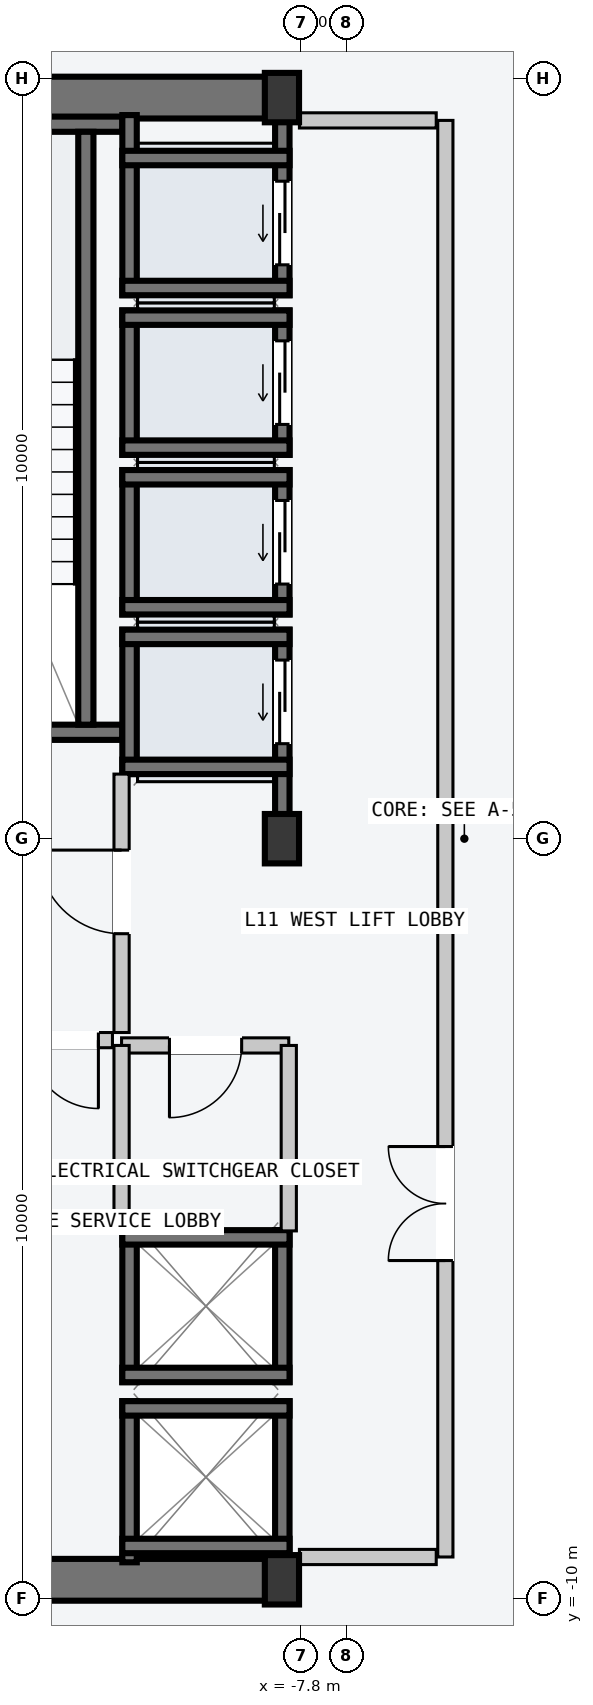
"""IFC4 building model, lengths in metres.
Left out: names, types, materials, properties, quantities, classifications, styles, units other than length and angle.
Written with IfcOpenShell. Run it as: python <this file> out.ifc"""

import sys

from ifc_helpers import new_model, si_unit, direction, frame, frame_2d, origin, origin_2d, place, context, subcontext, project, spatial, rectangle, i_section, extrude, element, fill, save


model = new_model("IFC4")
c1 = context("Model", 3, precision=1e-05, world=origin(), true_north=direction((0.0, 1.0)))
c2 = subcontext(c1, "Body", "Model", "MODEL_VIEW")
j1 = project(units=[si_unit("LENGTHUNIT", "METRE"), si_unit("PLANEANGLEUNIT", "RADIAN")], contexts=[c1])
p1 = place(None, origin())
s1 = spatial("IfcSite", under=j1, at=p1, CompositionType="ELEMENT")
p2 = place(p1, origin())
s2 = spatial("IfcBuilding", under=s1, at=p2, CompositionType="ELEMENT")
p3 = place(p2, frame((0.0, 0.0, 45.6)))
s3 = spatial("IfcBuildingStorey", under=s2, at=p3, CompositionType="ELEMENT", Elevation=45.6)
for number, where, z_axis, x_axis in (
    (1, (-14.53, -9.75, -0.2), (0.0, 0.0, 1.0), (1.0, 0.0, 0.0)),
    (2, (-14.53, 9.75, -0.2), (0.0, 0.0, 1.0), (1.0, 0.0, 0.0)),
):
    element("IfcWall", number, at=place(p3, frame(where, z_axis=z_axis, x_axis=x_axis)), inside=s3, PredefinedType="SHEAR", context=c2, shape_type="SweptSolid", body=[
        extrude(rectangle(XDim=6.46, YDim=0.55, at=frame_2d((3.23, 0.0))), origin(), (0.0, 0.0, 1.0), 3.6),
    ])
p4 = place(p3, frame((-14.25, 1.4, -0.2), z_axis=(0.0, 0.0, 1.0), x_axis=(1.0, 0.0, 0.0)))
e3 = element("IfcWall", 3, at=p4, inside=s3, PredefinedType="SOLIDWALL", context=c2, shape_type="SweptSolid", body=[
    extrude(rectangle(XDim=4.1, YDim=0.2, at=frame_2d((2.05, 0.0))), origin(), (0.0, 0.0, 1.0), 3.6),
])
p5 = place(p4, frame((1.5, 0.0, 0.2)))
e4 = element("IfcOpeningElement", 4, at=p5, cuts=e3, PredefinedType="OPENING", context=c2, shape_type="SweptSolid", body=[
    extrude(rectangle(XDim=1.12, YDim=2.18, at=frame_2d((0.56, 1.09))), frame((0.0, 0.11, 0.0), z_axis=(0.0, -1.0, 0.0), x_axis=(1.0, 0.0, 0.0)), (0.0, 0.0, 1.0), 0.22),
])
p6 = place(p3, frame((-14.25, 9.4, -0.2), z_axis=(0.0, 0.0, 1.0), x_axis=(1.0, 0.0, 0.0)))
e5 = element("IfcWall", 5, at=p6, inside=s3, PredefinedType="SOLIDWALL", context=c2, shape_type="SweptSolid", body=[
    extrude(rectangle(XDim=4.1, YDim=0.2, at=frame_2d((2.05, 0.0))), origin(), (0.0, 0.0, 1.0), 3.6),
])
p7 = place(p3, frame((-10.63, 1.5, -0.2), z_axis=(0.0, 0.0, 1.0), x_axis=(0.0, 1.0, 0.0)))
e6 = element("IfcWall", 6, at=p7, inside=s3, PredefinedType="SOLIDWALL", context=c2, shape_type="SweptSolid", body=[
    extrude(rectangle(XDim=7.8, YDim=0.2, at=frame_2d((3.9, 0.0))), origin(), (0.0, 0.0, 1.0), 3.6),
])
for number, where, z_axis, x_axis in (
    (7, (-8.05, -9.75, 0.0), (0.0, 0.0, 1.0), (1.0, 0.0, 0.0)),
    (8, (-8.05, 0.0, 0.0), (0.0, 0.0, 1.0), (1.0, 0.0, 0.0)),
    (9, (-8.05, 9.75, 0.0), (0.0, 0.0, 1.0), (1.0, 0.0, 0.0)),
):
    element("IfcColumn", number, at=place(p3, frame(where, z_axis=z_axis, x_axis=x_axis)), inside=s3, PredefinedType="COLUMN", context=c2, shape_type="SweptSolid", body=[
        extrude(i_section(OverallWidth=0.45, OverallDepth=0.65, WebThickness=0.025, FlangeThickness=0.04, at=origin_2d()), origin(), (0.0, 0.0, 1.0), 3.6),
    ])
p8 = place(p3, frame((-8.045, 0.21, -0.2), z_axis=(0.0, 0.0, 1.0), x_axis=(0.0, 1.0, 0.0)))
e10 = element("IfcWall", 10, at=p8, inside=s3, PredefinedType="SOLIDWALL", context=c2, shape_type="SweptSolid", body=[
    extrude(rectangle(XDim=2.54, YDim=0.19, at=frame_2d((1.27, 0.0))), origin(), (0.0, 0.0, 1.0), 3.6),
])
p9 = place(p8, frame((1.04, 0.0, 0.2)))
e11 = element("IfcOpeningElement", 11, at=p9, cuts=e10, PredefinedType="OPENING", context=c2, shape_type="SweptSolid", body=[
    extrude(rectangle(XDim=1.1, YDim=2.2, at=frame_2d((0.55, 1.1))), frame((0.0, 0.105, 0.0), z_axis=(0.0, -1.0, 0.0), x_axis=(1.0, 0.0, 0.0)), (0.0, 0.0, 1.0), 0.21),
])
p10 = place(p3, frame((-10.055, 0.85, -0.2), z_axis=(0.0, 0.0, 1.0), x_axis=(0.0, 1.0, 0.0)))
e12 = element("IfcWall", 12, at=p10, inside=s3, PredefinedType="SOLIDWALL", context=c2, shape_type="SweptSolid", body=[
    extrude(rectangle(XDim=1.9, YDim=0.19, at=frame_2d((0.95, 0.0))), origin(), (0.0, 0.0, 1.0), 3.6),
])
for number, where, z_axis, x_axis in (
    (13, (-10.15, 2.655, -0.2), (0.0, 0.0, 1.0), (1.0, 0.0, 0.0)),
    (14, (-10.15, 0.945, -0.2), (0.0, 0.0, 1.0), (1.0, 0.0, 0.0)),
):
    element("IfcWall", number, at=place(p3, frame(where, z_axis=z_axis, x_axis=x_axis)), inside=s3, PredefinedType="SOLIDWALL", context=c2, shape_type="SweptSolid", body=[
        extrude(rectangle(XDim=2.2, YDim=0.19, at=frame_2d((1.1, 0.0))), origin(), (0.0, 0.0, 1.0), 3.6),
    ])
p11 = place(p3, frame((-8.045, 2.95, -0.2), z_axis=(0.0, 0.0, 1.0), x_axis=(0.0, 1.0, 0.0)))
e15 = element("IfcWall", 15, at=p11, inside=s3, PredefinedType="SOLIDWALL", context=c2, shape_type="SweptSolid", body=[
    extrude(rectangle(XDim=1.9, YDim=0.19, at=frame_2d((0.95, 0.0))), origin(), (0.0, 0.0, 1.0), 3.6),
])
p12 = place(p11, frame((0.4, 0.0, 0.2)))
e16 = element("IfcOpeningElement", 16, at=p12, cuts=e15, PredefinedType="OPENING", context=c2, shape_type="SweptSolid", body=[
    extrude(rectangle(XDim=1.1, YDim=2.2, at=frame_2d((0.55, 1.1))), frame((0.0, 0.105, 0.0), z_axis=(0.0, -1.0, 0.0), x_axis=(1.0, 0.0, 0.0)), (0.0, 0.0, 1.0), 0.21),
])
p13 = place(p3, frame((-10.055, 2.95, -0.2), z_axis=(0.0, 0.0, 1.0), x_axis=(0.0, 1.0, 0.0)))
e17 = element("IfcWall", 17, at=p13, inside=s3, PredefinedType="SOLIDWALL", context=c2, shape_type="SweptSolid", body=[
    extrude(rectangle(XDim=1.9, YDim=0.19, at=frame_2d((0.95, 0.0))), origin(), (0.0, 0.0, 1.0), 3.6),
])
for number, where, z_axis, x_axis in (
    (18, (-10.15, 4.755, -0.2), (0.0, 0.0, 1.0), (1.0, 0.0, 0.0)),
    (19, (-10.15, 3.045, -0.2), (0.0, 0.0, 1.0), (1.0, 0.0, 0.0)),
):
    element("IfcWall", number, at=place(p3, frame(where, z_axis=z_axis, x_axis=x_axis)), inside=s3, PredefinedType="SOLIDWALL", context=c2, shape_type="SweptSolid", body=[
        extrude(rectangle(XDim=2.2, YDim=0.19, at=frame_2d((1.1, 0.0))), origin(), (0.0, 0.0, 1.0), 3.6),
    ])
p14 = place(p3, frame((-8.045, 5.05, -0.2), z_axis=(0.0, 0.0, 1.0), x_axis=(0.0, 1.0, 0.0)))
e20 = element("IfcWall", 20, at=p14, inside=s3, PredefinedType="SOLIDWALL", context=c2, shape_type="SweptSolid", body=[
    extrude(rectangle(XDim=1.9, YDim=0.19, at=frame_2d((0.95, 0.0))), origin(), (0.0, 0.0, 1.0), 3.6),
])
p15 = place(p14, frame((0.4, 0.0, 0.2)))
e21 = element("IfcOpeningElement", 21, at=p15, cuts=e20, PredefinedType="OPENING", context=c2, shape_type="SweptSolid", body=[
    extrude(rectangle(XDim=1.1, YDim=2.2, at=frame_2d((0.55, 1.1))), frame((0.0, 0.105, 0.0), z_axis=(0.0, -1.0, 0.0), x_axis=(1.0, 0.0, 0.0)), (0.0, 0.0, 1.0), 0.21),
])
p16 = place(p3, frame((-10.055, 5.05, -0.2), z_axis=(0.0, 0.0, 1.0), x_axis=(0.0, 1.0, 0.0)))
e22 = element("IfcWall", 22, at=p16, inside=s3, PredefinedType="SOLIDWALL", context=c2, shape_type="SweptSolid", body=[
    extrude(rectangle(XDim=1.9, YDim=0.19, at=frame_2d((0.95, 0.0))), origin(), (0.0, 0.0, 1.0), 3.6),
])
for number, where, z_axis, x_axis in (
    (23, (-10.15, 6.855, -0.2), (0.0, 0.0, 1.0), (1.0, 0.0, 0.0)),
    (24, (-10.15, 5.145, -0.2), (0.0, 0.0, 1.0), (1.0, 0.0, 0.0)),
):
    element("IfcWall", number, at=place(p3, frame(where, z_axis=z_axis, x_axis=x_axis)), inside=s3, PredefinedType="SOLIDWALL", context=c2, shape_type="SweptSolid", body=[
        extrude(rectangle(XDim=2.2, YDim=0.19, at=frame_2d((1.1, 0.0))), origin(), (0.0, 0.0, 1.0), 3.6),
    ])
p17 = place(p3, frame((-8.045, 7.15, -0.2), z_axis=(0.0, 0.0, 1.0), x_axis=(0.0, 1.0, 0.0)))
e25 = element("IfcWall", 25, at=p17, inside=s3, PredefinedType="SOLIDWALL", context=c2, shape_type="SweptSolid", body=[
    extrude(rectangle(XDim=2.37, YDim=0.19, at=frame_2d((1.185, 0.0))), origin(), (0.0, 0.0, 1.0), 3.6),
])
p18 = place(p17, frame((0.4, 0.0, 0.2)))
e26 = element("IfcOpeningElement", 26, at=p18, cuts=e25, PredefinedType="OPENING", context=c2, shape_type="SweptSolid", body=[
    extrude(rectangle(XDim=1.1, YDim=2.2, at=frame_2d((0.55, 1.1))), frame((0.0, 0.105, 0.0), z_axis=(0.0, -1.0, 0.0), x_axis=(1.0, 0.0, 0.0)), (0.0, 0.0, 1.0), 0.21),
])
p19 = place(p3, frame((-10.055, 7.15, -0.2), z_axis=(0.0, 0.0, 1.0), x_axis=(0.0, 1.0, 0.0)))
e27 = element("IfcWall", 27, at=p19, inside=s3, PredefinedType="SOLIDWALL", context=c2, shape_type="SweptSolid", body=[
    extrude(rectangle(XDim=2.37, YDim=0.19, at=frame_2d((1.185, 0.0))), origin(), (0.0, 0.0, 1.0), 3.6),
])
for number, where, z_axis, x_axis in (
    (28, (-10.15, 8.955, -0.2), (0.0, 0.0, 1.0), (1.0, 0.0, 0.0)),
    (29, (-10.15, 7.245, -0.2), (0.0, 0.0, 1.0), (1.0, 0.0, 0.0)),
):
    element("IfcWall", number, at=place(p3, frame(where, z_axis=z_axis, x_axis=x_axis)), inside=s3, PredefinedType="SOLIDWALL", context=c2, shape_type="SweptSolid", body=[
        extrude(rectangle(XDim=2.2, YDim=0.19, at=frame_2d((1.1, 0.0))), origin(), (0.0, 0.0, 1.0), 3.6),
    ])
for number, where, z_axis, x_axis in (
    (30, (-8.045, -9.52, -0.2), (0.0, 0.0, 1.0), (0.0, 1.0, 0.0)),
    (31, (-10.055, -9.52, -0.2), (0.0, 0.0, 1.0), (0.0, 1.0, 0.0)),
):
    element("IfcWall", number, at=place(p3, frame(where, z_axis=z_axis, x_axis=x_axis)), inside=s3, PredefinedType="SOLIDWALL", context=c2, shape_type="SweptSolid", body=[
        extrude(rectangle(XDim=2.12, YDim=0.19, at=frame_2d((1.06, 0.0))), origin(), (0.0, 0.0, 1.0), 3.6),
    ])
for number, where, z_axis, x_axis in (
    (32, (-10.15, -7.495, -0.2), (0.0, 0.0, 1.0), (1.0, 0.0, 0.0)),
    (33, (-10.15, -9.305, -0.2), (0.0, 0.0, 1.0), (1.0, 0.0, 0.0)),
):
    element("IfcWall", number, at=place(p3, frame(where, z_axis=z_axis, x_axis=x_axis)), inside=s3, PredefinedType="SOLIDWALL", context=c2, shape_type="SweptSolid", body=[
        extrude(rectangle(XDim=2.2, YDim=0.19, at=frame_2d((1.1, 0.0))), origin(), (0.0, 0.0, 1.0), 3.6),
    ])
for number, where, z_axis, x_axis in (
    (34, (-8.045, -7.15, -0.2), (0.0, 0.0, 1.0), (0.0, 1.0, 0.0)),
    (35, (-10.055, -7.15, -0.2), (0.0, 0.0, 1.0), (0.0, 1.0, 0.0)),
):
    element("IfcWall", number, at=place(p3, frame(where, z_axis=z_axis, x_axis=x_axis)), inside=s3, PredefinedType="SOLIDWALL", context=c2, shape_type="SweptSolid", body=[
        extrude(rectangle(XDim=2.0, YDim=0.19, at=frame_2d((1.0, 0.0))), origin(), (0.0, 0.0, 1.0), 3.6),
    ])
for number, where, z_axis, x_axis in (
    (36, (-10.15, -5.245, -0.2), (0.0, 0.0, 1.0), (1.0, 0.0, 0.0)),
    (37, (-10.15, -7.055, -0.2), (0.0, 0.0, 1.0), (1.0, 0.0, 0.0)),
):
    element("IfcWall", number, at=place(p3, frame(where, z_axis=z_axis, x_axis=x_axis)), inside=s3, PredefinedType="SOLIDWALL", context=c2, shape_type="SweptSolid", body=[
        extrude(rectangle(XDim=2.2, YDim=0.19, at=frame_2d((1.1, 0.0))), origin(), (0.0, 0.0, 1.0), 3.6),
    ])
p20 = place(p3, frame((-5.9, -9.45, 0.0), z_axis=(0.0, 0.0, 1.0), x_axis=(0.0, 1.0, 0.0)))
e38 = element("IfcWall", 38, at=p20, inside=s3, PredefinedType="PARTITIONING", context=c2, shape_type="SweptSolid", body=[
    extrude(rectangle(XDim=18.9, YDim=0.2, at=frame_2d((9.45, 0.0))), origin(), (0.0, 0.0, 1.0), 3.4),
])
p21 = place(p20, frame((3.9, 0.0, 0.0)))
e39 = element("IfcOpeningElement", 39, at=p21, cuts=e38, PredefinedType="OPENING", context=c2, shape_type="SweptSolid", body=[
    extrude(rectangle(XDim=1.5, YDim=2.2, at=frame_2d((0.75, 1.1))), frame((0.0, 0.11, 0.0), z_axis=(0.0, -1.0, 0.0), x_axis=(1.0, 0.0, 0.0)), (0.0, 0.0, 1.0), 0.22),
])
for number, where, z_axis, x_axis in (
    (40, (-6.02, -9.45, 0.0), (0.0, 0.0, 1.0), (-1.0, 0.0, 0.0)),
    (41, (-6.02, 9.45, 0.0), (0.0, 0.0, 1.0), (-1.0, 0.0, 0.0)),
):
    element("IfcWall", number, at=place(p3, frame(where, z_axis=z_axis, x_axis=x_axis)), inside=s3, PredefinedType="PARTITIONING", context=c2, shape_type="SweptSolid", body=[
        extrude(rectangle(XDim=1.8, YDim=0.2, at=frame_2d((0.9, 0.0))), origin(), (0.0, 0.0, 1.0), 3.4),
    ])
p22 = place(p3, frame((-10.16, -2.55, 0.0), z_axis=(0.0, 0.0, 1.0), x_axis=(0.0, 1.0, 0.0)))
e42 = element("IfcWall", 42, at=p22, inside=s3, PredefinedType="PARTITIONING", context=c2, shape_type="SweptSolid", body=[
    extrude(rectangle(XDim=3.4, YDim=0.2, at=frame_2d((1.7, 0.0))), origin(), (0.0, 0.0, 1.0), 3.4),
])
p23 = place(p22, frame((1.3, 0.0, 0.0)))
e43 = element("IfcOpeningElement", 43, at=p23, cuts=e42, PredefinedType="OPENING", context=c2, shape_type="SweptSolid", body=[
    extrude(rectangle(XDim=1.1, YDim=2.15, at=frame_2d((0.55, 1.075))), frame((0.0, 0.11, 0.0), z_axis=(0.0, -1.0, 0.0), x_axis=(1.0, 0.0, 0.0)), (0.0, 0.0, 1.0), 0.22),
])
p24 = place(p3, frame((-10.28, -2.65, 0.0), z_axis=(0.0, 0.0, 1.0), x_axis=(-1.0, 0.0, 0.0)))
e44 = element("IfcWall", 44, at=p24, inside=s3, PredefinedType="PARTITIONING", context=c2, shape_type="SweptSolid", body=[
    extrude(rectangle(XDim=1.27, YDim=0.2, at=frame_2d((0.635, 0.0))), origin(), (0.0, 0.0, 1.0), 3.4),
])
p25 = place(p24, frame((0.185, 0.0, 0.0)))
e45 = element("IfcOpeningElement", 45, at=p25, cuts=e44, PredefinedType="OPENING", context=c2, shape_type="SweptSolid", body=[
    extrude(rectangle(XDim=0.9, YDim=2.15, at=frame_2d((0.45, 1.075))), frame((0.0, 0.11, 0.0), z_axis=(0.0, -1.0, 0.0), x_axis=(1.0, 0.0, 0.0)), (0.0, 0.0, 1.0), 0.22),
])
p26 = place(p3, frame((-7.96, -2.72, 0.0), z_axis=(0.0, 0.0, 1.0), x_axis=(-1.0, 0.0, 0.0)))
e46 = element("IfcWall", 46, at=p26, inside=s3, PredefinedType="PARTITIONING", context=c2, shape_type="SweptSolid", body=[
    extrude(rectangle(XDim=2.2, YDim=0.2, at=frame_2d((1.1, 0.0))), origin(), (0.0, 0.0, 1.0), 3.4),
])
p27 = place(p26, frame((0.62, 0.0, 0.0)))
e47 = element("IfcOpeningElement", 47, at=p27, cuts=e46, PredefinedType="OPENING", context=c2, shape_type="SweptSolid", body=[
    extrude(rectangle(XDim=0.95, YDim=2.1, at=frame_2d((0.475, 1.05))), frame((0.0, 0.11, 0.0), z_axis=(0.0, -1.0, 0.0), x_axis=(1.0, 0.0, 0.0)), (0.0, 0.0, 1.0), 0.22),
])
for number, where, z_axis, x_axis in (
    (48, (-7.96, -5.16, 0.0), (0.0, 0.0, 1.0), (0.0, 1.0, 0.0)),
    (49, (-10.16, -5.16, 0.0), (0.0, 0.0, 1.0), (0.0, 1.0, 0.0)),
):
    element("IfcWall", number, at=place(p3, frame(where, z_axis=z_axis, x_axis=x_axis)), inside=s3, PredefinedType="PARTITIONING", context=c2, shape_type="SweptSolid", body=[
        extrude(rectangle(XDim=2.44, YDim=0.2, at=frame_2d((1.22, 0.0))), origin(), (0.0, 0.0, 1.0), 3.4),
    ])
p28 = place(p9, origin())
e50 = element("IfcDoor", 50, at=p28, inside=s3, OperationType="SLIDING_TO_LEFT", PredefinedType="DOOR", context=c2, shape_type="SweptSolid", body=[
    extrude(rectangle(XDim=1.1, YDim=2.2, at=frame_2d((0.55, 1.1))), frame((0.0, 0.025, 0.0), z_axis=(0.0, -1.0, 0.0), x_axis=(1.0, 0.0, 0.0)), (0.0, 0.0, 1.0), 0.05),
])
fill(e11, e50)
p29 = place(p12, origin())
e51 = element("IfcDoor", 51, at=p29, inside=s3, OperationType="SLIDING_TO_LEFT", PredefinedType="DOOR", context=c2, shape_type="SweptSolid", body=[
    extrude(rectangle(XDim=1.1, YDim=2.2, at=frame_2d((0.55, 1.1))), frame((0.0, 0.025, 0.0), z_axis=(0.0, -1.0, 0.0), x_axis=(1.0, 0.0, 0.0)), (0.0, 0.0, 1.0), 0.05),
])
fill(e16, e51)
p30 = place(p15, origin())
e52 = element("IfcDoor", 52, at=p30, inside=s3, OperationType="SLIDING_TO_LEFT", PredefinedType="DOOR", context=c2, shape_type="SweptSolid", body=[
    extrude(rectangle(XDim=1.1, YDim=2.2, at=frame_2d((0.55, 1.1))), frame((0.0, 0.025, 0.0), z_axis=(0.0, -1.0, 0.0), x_axis=(1.0, 0.0, 0.0)), (0.0, 0.0, 1.0), 0.05),
])
fill(e21, e52)
p31 = place(p18, origin())
e53 = element("IfcDoor", 53, at=p31, inside=s3, OperationType="SLIDING_TO_LEFT", PredefinedType="DOOR", context=c2, shape_type="SweptSolid", body=[
    extrude(rectangle(XDim=1.1, YDim=2.2, at=frame_2d((0.55, 1.1))), frame((0.0, 0.025, 0.0), z_axis=(0.0, -1.0, 0.0), x_axis=(1.0, 0.0, 0.0)), (0.0, 0.0, 1.0), 0.05),
])
fill(e26, e53)
p32 = place(p21, origin())
e54 = element("IfcDoor", 54, at=p32, inside=s3, OperationType="DOUBLE_DOOR_SINGLE_SWING", PredefinedType="DOOR", context=c2, shape_type="SweptSolid", body=[
    extrude(rectangle(XDim=1.5, YDim=2.2, at=frame_2d((0.75, 1.1))), frame((0.0, 0.025, 0.0), z_axis=(0.0, -1.0, 0.0), x_axis=(1.0, 0.0, 0.0)), (0.0, 0.0, 1.0), 0.05),
])
fill(e39, e54)
p33 = place(p23, origin())
e55 = element("IfcDoor", 55, at=p33, inside=s3, OperationType="SINGLE_SWING_RIGHT", PredefinedType="DOOR", context=c2, shape_type="SweptSolid", body=[
    extrude(rectangle(XDim=1.1, YDim=2.15, at=frame_2d((0.55, 1.075))), frame((0.0, 0.025, 0.0), z_axis=(0.0, -1.0, 0.0), x_axis=(1.0, 0.0, 0.0)), (0.0, 0.0, 1.0), 0.05),
])
fill(e43, e55)
p34 = place(p25, origin())
e56 = element("IfcDoor", 56, at=p34, inside=s3, OperationType="SINGLE_SWING_LEFT", PredefinedType="DOOR", context=c2, shape_type="SweptSolid", body=[
    extrude(rectangle(XDim=0.9, YDim=2.15, at=frame_2d((0.45, 1.075))), frame((0.0, 0.025, 0.0), z_axis=(0.0, -1.0, 0.0), x_axis=(1.0, 0.0, 0.0)), (0.0, 0.0, 1.0), 0.05),
])
fill(e45, e56)
p35 = place(p27, origin())
e57 = element("IfcDoor", 57, at=p35, inside=s3, OperationType="SINGLE_SWING_RIGHT", PredefinedType="DOOR", context=c2, shape_type="SweptSolid", body=[
    extrude(rectangle(XDim=0.95, YDim=2.1, at=frame_2d((0.475, 1.05))), frame((0.0, 0.025, 0.0), z_axis=(0.0, -1.0, 0.0), x_axis=(1.0, 0.0, 0.0)), (0.0, 0.0, 1.0), 0.05),
])
fill(e47, e57)
save(model, sys.argv[1])
